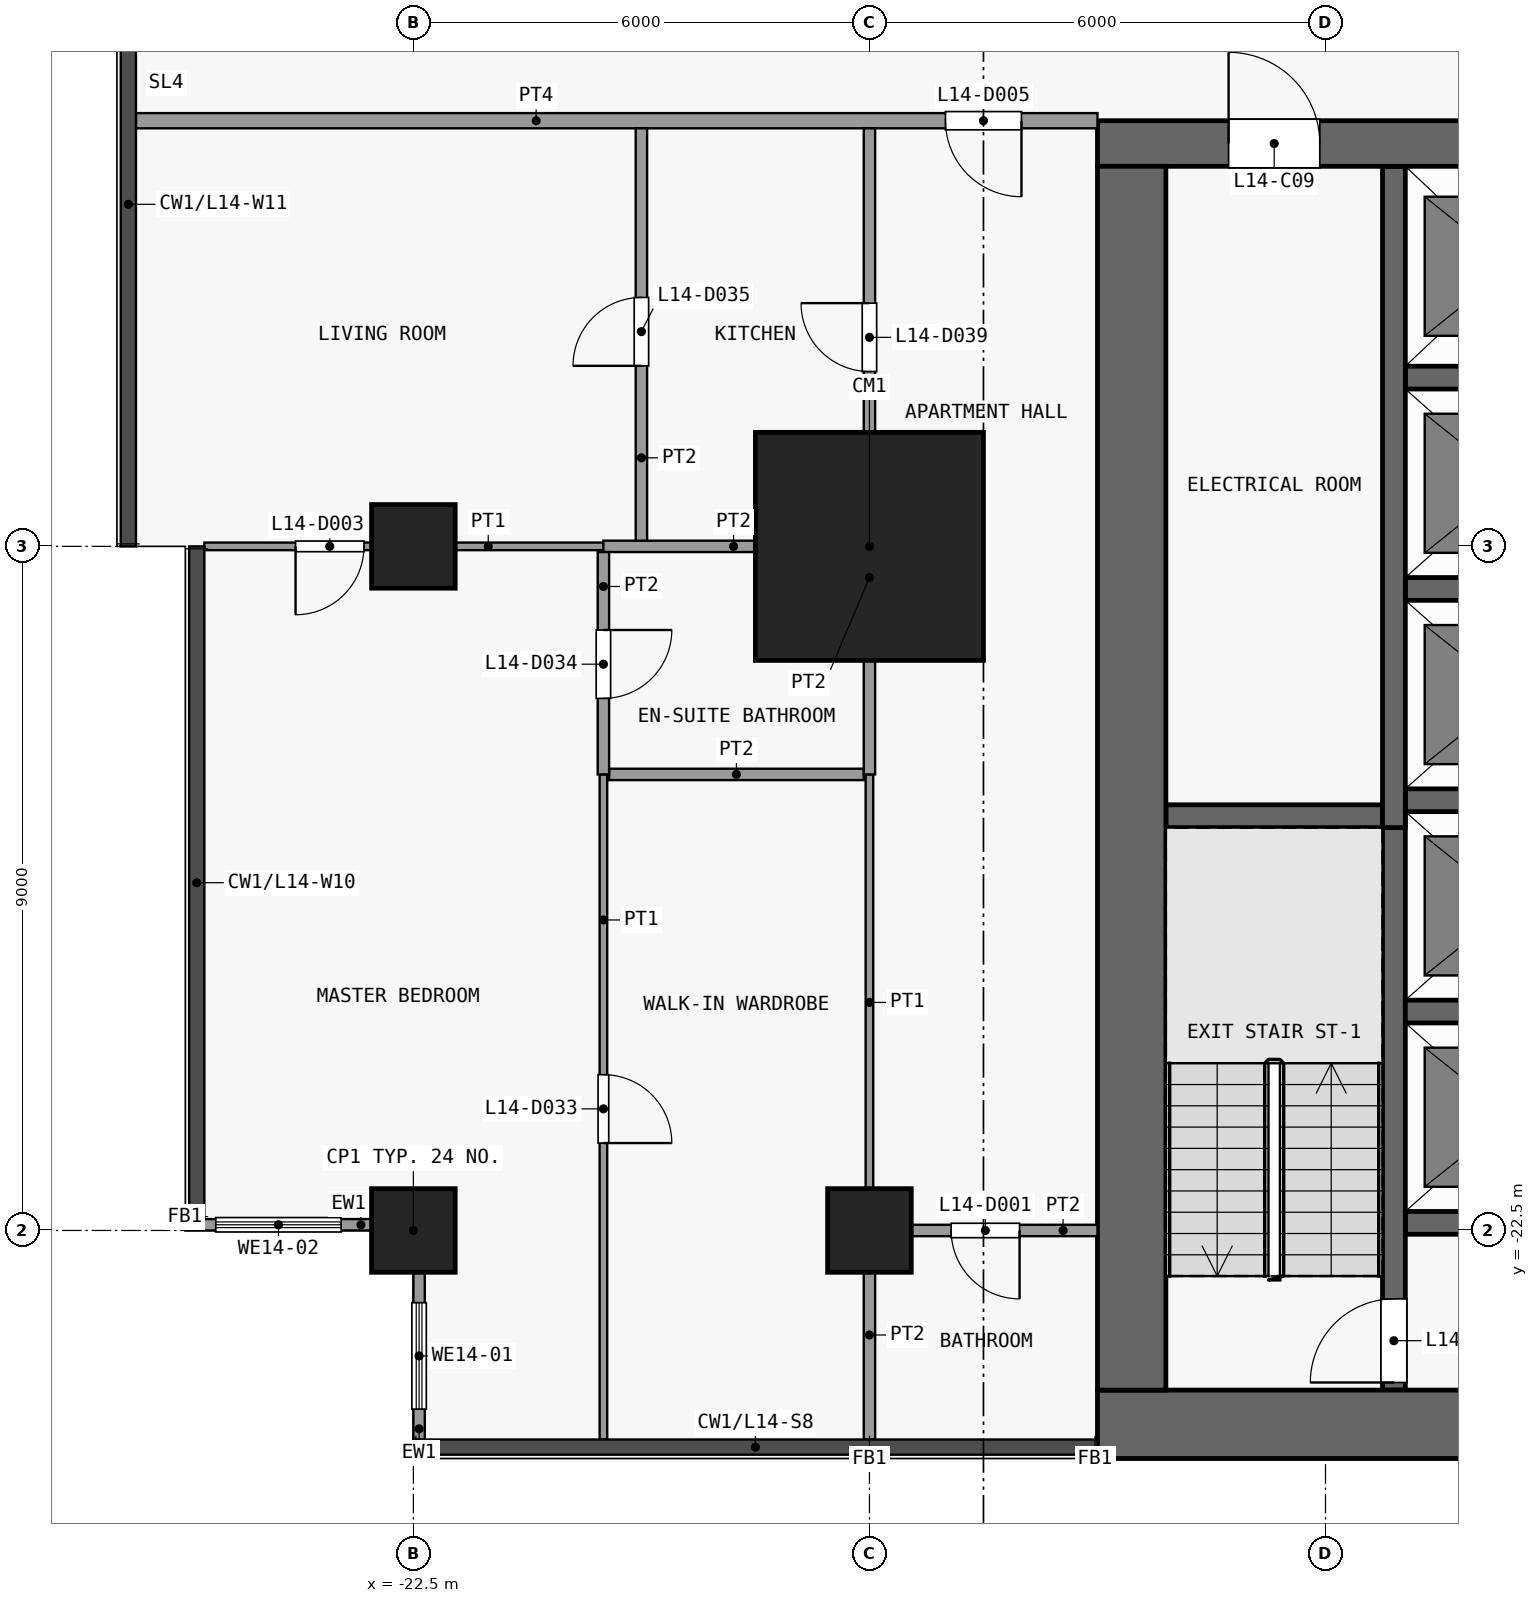
"""IFC4 building model, lengths in metres.
Left out: names, types, materials, properties, quantities, classifications, styles, units other than length and angle.
Written with IfcOpenShell. Run it as: python <this file> out.ifc"""

import sys

from ifc_helpers import new_model, si_unit, direction, frame, frame_2d, origin, origin_2d, place, context, subcontext, project, spatial, rectangle, extrude, element, fill, save


model = new_model("IFC4")
c1 = context("Model", 3, precision=1e-05, world=origin(), true_north=direction((0.0, 1.0)))
c2 = subcontext(c1, "Body", "Model", "MODEL_VIEW")
j1 = project(units=[si_unit("LENGTHUNIT", "METRE"), si_unit("PLANEANGLEUNIT", "RADIAN")], contexts=[c1])
p1 = place(None, origin())
s1 = spatial("IfcSite", under=j1, at=p1, CompositionType="ELEMENT")
p2 = place(p1, origin())
s2 = spatial("IfcBuilding", under=s1, at=p2, CompositionType="ELEMENT")
p3 = place(p2, frame((0.0, 0.0, 61.3)))
s3 = spatial("IfcBuildingStorey", under=s2, at=p3, CompositionType="ELEMENT", Elevation=61.3)
for number, where, z_axis, x_axis in (
    (1, (-22.5, -22.5, 0.0), (0.0, 0.0, 1.0), (1.0, 0.0, 0.0)),
    (2, (-22.5, -13.5, 0.0), (0.0, 0.0, 1.0), (1.0, 0.0, 0.0)),
    (3, (-16.5, -22.5, 0.0), (0.0, 0.0, 1.0), (1.0, 0.0, 0.0)),
):
    element("IfcColumn", number, at=place(p3, frame(where, z_axis=z_axis, x_axis=x_axis)), inside=s3, PredefinedType="COLUMN", context=c2, shape_type="SweptSolid", body=[
        extrude(rectangle(XDim=1.1, YDim=1.1, at=origin_2d()), origin(), (0.0, 0.0, 1.0), 3.6),
    ])
p4 = place(p3, frame((-16.5, -13.5, 0.0), z_axis=(0.0, 0.0, 1.0), x_axis=(1.0, 0.0, 0.0)))
e4 = element("IfcColumn", 4, at=p4, inside=s3, PredefinedType="COLUMN", context=c2, shape_type="SweptSolid", body=[
    extrude(rectangle(XDim=3.0, YDim=3.0, at=origin_2d()), origin(), (0.0, 0.0, 1.0), 3.6),
])
p5 = place(p3, frame((-13.5, -25.05, 0.0), z_axis=(0.0, 0.0, 1.0), x_axis=(1.0, 0.0, 0.0)))
e5 = element("IfcWall", 5, at=p5, inside=s3, PredefinedType="SHEAR", context=c2, shape_type="SweptSolid", body=[
    extrude(rectangle(XDim=27.0, YDim=0.9, at=frame_2d((13.5, 0.0))), origin(), (0.0, 0.0, 1.0), 3.3),
])
p6 = place(p3, frame((-13.5, -8.2, 0.0), z_axis=(0.0, 0.0, 1.0), x_axis=(1.0, 0.0, 0.0)))
e6 = element("IfcWall", 6, at=p6, inside=s3, PredefinedType="SHEAR", context=c2, shape_type="SweptSolid", body=[
    extrude(rectangle(XDim=27.0, YDim=0.6, at=frame_2d((13.5, 0.0))), origin(), (0.0, 0.0, 1.0), 3.3),
])
p7 = place(p6, frame((7.8, 0.0, 0.0)))
e7 = element("IfcOpeningElement", 7, at=p7, cuts=e6, PredefinedType="OPENING", context=c2, shape_type="SweptSolid", body=[
    extrude(rectangle(XDim=1.8, YDim=2.1, at=frame_2d((0.9, 1.05))), frame((0.0, 0.31, 0.0), z_axis=(0.0, -1.0, 0.0), x_axis=(1.0, 0.0, 0.0)), (0.0, 0.0, 1.0), 0.62),
])
p8 = place(p6, frame((17.4, 0.0, 0.0)))
e8 = element("IfcOpeningElement", 8, at=p8, cuts=e6, PredefinedType="OPENING", context=c2, shape_type="SweptSolid", body=[
    extrude(rectangle(XDim=1.8, YDim=2.1, at=frame_2d((0.9, 1.05))), frame((0.0, 0.31, 0.0), z_axis=(0.0, -1.0, 0.0), x_axis=(1.0, 0.0, 0.0)), (0.0, 0.0, 1.0), 0.62),
])
p9 = place(p6, frame((1.725, 0.0, 0.0)))
e9 = element("IfcOpeningElement", 9, at=p9, cuts=e6, PredefinedType="OPENING", context=c2, shape_type="SweptSolid", body=[
    extrude(rectangle(XDim=1.2, YDim=2.1, at=frame_2d((0.6, 1.05))), frame((0.0, 0.31, 0.0), z_axis=(0.0, -1.0, 0.0), x_axis=(1.0, 0.0, 0.0)), (0.0, 0.0, 1.0), 0.62),
])
p10 = place(p6, frame((23.375, 0.0, 0.0)))
e10 = element("IfcOpeningElement", 10, at=p10, cuts=e6, PredefinedType="OPENING", context=c2, shape_type="SweptSolid", body=[
    extrude(rectangle(XDim=0.9, YDim=2.1, at=frame_2d((0.45, 1.05))), frame((0.0, 0.31, 0.0), z_axis=(0.0, -1.0, 0.0), x_axis=(1.0, 0.0, 0.0)), (0.0, 0.0, 1.0), 0.62),
])
p11 = place(p3, frame((-13.05, -24.6, 0.0), z_axis=(0.0, 0.0, 1.0), x_axis=(0.0, 1.0, 0.0)))
e11 = element("IfcWall", 11, at=p11, inside=s3, PredefinedType="SHEAR", context=c2, shape_type="SweptSolid", body=[
    extrude(rectangle(XDim=16.1, YDim=0.9, at=frame_2d((8.05, 0.0))), origin(), (0.0, 0.0, 1.0), 3.3),
])
for number, where, z_axis, x_axis in (
    (12, (-9.45, -22.4, 0.0), (0.0, 0.0, 1.0), (1.0, 0.0, 0.0)),
    (13, (-9.45, -19.62, 0.0), (0.0, 0.0, 1.0), (1.0, 0.0, 0.0)),
):
    element("IfcWall", number, at=place(p3, frame(where, z_axis=z_axis, x_axis=x_axis)), inside=s3, PredefinedType="SHEAR", context=c2, shape_type="SweptSolid", body=[
        extrude(rectangle(XDim=2.8, YDim=0.3, at=frame_2d((1.4, 0.0))), origin(), (0.0, 0.0, 1.0), 3.3),
    ])
p12 = place(p3, frame((-12.6, -17.05, 0.0), z_axis=(0.0, 0.0, 1.0), x_axis=(1.0, 0.0, 0.0)))
e14 = element("IfcWall", 14, at=p12, inside=s3, PredefinedType="SHEAR", context=c2, shape_type="SweptSolid", body=[
    extrude(rectangle(XDim=2.85, YDim=0.3, at=frame_2d((1.425, 0.0))), origin(), (0.0, 0.0, 1.0), 3.3),
])
for number, where, z_axis, x_axis in (
    (15, (-9.45, -16.84, 0.0), (0.0, 0.0, 1.0), (1.0, 0.0, 0.0)),
    (16, (-9.45, -14.06, 0.0), (0.0, 0.0, 1.0), (1.0, 0.0, 0.0)),
    (17, (-9.45, -11.28, 0.0), (0.0, 0.0, 1.0), (1.0, 0.0, 0.0)),
):
    element("IfcWall", number, at=place(p3, frame(where, z_axis=z_axis, x_axis=x_axis)), inside=s3, PredefinedType="SHEAR", context=c2, shape_type="SweptSolid", body=[
        extrude(rectangle(XDim=2.8, YDim=0.3, at=frame_2d((1.4, 0.0))), origin(), (0.0, 0.0, 1.0), 3.3),
    ])
p13 = place(p3, frame((-9.6, -24.6, 0.0), z_axis=(0.0, 0.0, 1.0), x_axis=(0.0, 1.0, 0.0)))
e18 = element("IfcWall", 18, at=p13, inside=s3, PredefinedType="SHEAR", context=c2, shape_type="SweptSolid", body=[
    extrude(rectangle(XDim=7.7, YDim=0.3, at=frame_2d((3.85, 0.0))), origin(), (0.0, 0.0, 1.0), 3.3),
])
p14 = place(p13, frame((0.1, 0.0, 0.0)))
e19 = element("IfcOpeningElement", 19, at=p14, cuts=e18, PredefinedType="OPENING", context=c2, shape_type="SweptSolid", body=[
    extrude(rectangle(XDim=1.1, YDim=2.1, at=frame_2d((0.55, 1.05))), frame((0.0, 0.16, 0.0), z_axis=(0.0, -1.0, 0.0), x_axis=(1.0, 0.0, 0.0)), (0.0, 0.0, 1.0), 0.32),
])
p15 = place(p3, frame((-9.6, -17.2, 0.0), z_axis=(0.0, 0.0, 1.0), x_axis=(0.0, 1.0, 0.0)))
e20 = element("IfcWall", 20, at=p15, inside=s3, PredefinedType="SHEAR", context=c2, shape_type="SweptSolid", body=[
    extrude(rectangle(XDim=8.7, YDim=0.3, at=frame_2d((4.35, 0.0))), origin(), (0.0, 0.0, 1.0), 3.3),
])
p16 = place(p3, frame((-22.425, -25.25, 0.0), z_axis=(0.0, 0.0, 1.0), x_axis=(0.0, 1.0, 0.0)))
e21 = element("IfcWall", 21, at=p16, inside=s3, PredefinedType="SOLIDWALL", context=c2, shape_type="SweptSolid", body=[
    extrude(rectangle(XDim=2.2, YDim=0.15, at=frame_2d((1.1, 0.0))), origin(), (0.0, 0.0, 1.0), 3.3),
])
p17 = place(p16, frame((0.4, 0.0, 0.9)))
e22 = element("IfcOpeningElement", 22, at=p17, cuts=e21, PredefinedType="OPENING", context=c2, shape_type="SweptSolid", body=[
    extrude(rectangle(XDim=1.4, YDim=2.4, at=frame_2d((0.7, 1.2))), frame((0.0, 0.085, 0.0), z_axis=(0.0, -1.0, 0.0), x_axis=(1.0, 0.0, 0.0)), (0.0, 0.0, 1.0), 0.17),
])
p18 = place(p3, frame((-23.05, -22.425, 0.0), z_axis=(0.0, 0.0, 1.0), x_axis=(-1.0, 0.0, 0.0)))
e23 = element("IfcWall", 23, at=p18, inside=s3, PredefinedType="SOLIDWALL", context=c2, shape_type="SweptSolid", body=[
    extrude(rectangle(XDim=2.45, YDim=0.15, at=frame_2d((1.225, 0.0))), origin(), (0.0, 0.0, 1.0), 3.3),
])
p19 = place(p18, frame((0.4, 0.0, 0.9)))
e24 = element("IfcOpeningElement", 24, at=p19, cuts=e23, PredefinedType="OPENING", context=c2, shape_type="SweptSolid", body=[
    extrude(rectangle(XDim=1.65, YDim=2.4, at=frame_2d((0.825, 1.2))), frame((0.0, 0.085, 0.0), z_axis=(0.0, -1.0, 0.0), x_axis=(1.0, 0.0, 0.0)), (0.0, 0.0, 1.0), 0.17),
])
p20 = place(p3, frame((-16.425, -22.5, 0.0), z_axis=(0.0, 0.0, 1.0), x_axis=(1.0, 0.0, 0.0)))
e25 = element("IfcWall", 25, at=p20, inside=s3, PredefinedType="PARTITIONING", context=c2, shape_type="SweptSolid", body=[
    extrude(rectangle(XDim=2.925, YDim=0.15, at=frame_2d((1.462, 0.0))), origin(), (0.0, 0.0, 1.0), 3.3),
])
p21 = place(p20, frame((1.0, 0.0, 0.0)))
e26 = element("IfcOpeningElement", 26, at=p21, cuts=e25, PredefinedType="OPENING", context=c2, shape_type="SweptSolid", body=[
    extrude(rectangle(XDim=0.9, YDim=2.1, at=frame_2d((0.45, 1.05))), frame((0.0, 0.085, 0.0), z_axis=(0.0, -1.0, 0.0), x_axis=(1.0, 0.0, 0.0)), (0.0, 0.0, 1.0), 0.17),
])
p22 = place(p3, frame((-19.925, -16.5, 0.0), z_axis=(0.0, 0.0, 1.0), x_axis=(1.0, 0.0, 0.0)))
e27 = element("IfcWall", 27, at=p22, inside=s3, PredefinedType="PARTITIONING", context=c2, shape_type="SweptSolid", body=[
    extrude(rectangle(XDim=3.35, YDim=0.15, at=frame_2d((1.675, 0.0))), origin(), (0.0, 0.0, 1.0), 3.3),
])
p23 = place(p3, frame((-25.25, -13.5, 0.0), z_axis=(0.0, 0.0, 1.0), x_axis=(1.0, 0.0, 0.0)))
e28 = element("IfcWall", 28, at=p23, inside=s3, PredefinedType="PARTITIONING", context=c2, shape_type="SweptSolid", body=[
    extrude(rectangle(XDim=5.25, YDim=0.1, at=frame_2d((2.625, 0.0))), origin(), (0.0, 0.0, 1.0), 3.3),
])
p24 = place(p23, frame((1.2, 0.0, 0.0)))
e29 = element("IfcOpeningElement", 29, at=p24, cuts=e28, PredefinedType="OPENING", context=c2, shape_type="SweptSolid", body=[
    extrude(rectangle(XDim=0.9, YDim=2.1, at=frame_2d((0.45, 1.05))), frame((0.0, 0.06, 0.0), z_axis=(0.0, -1.0, 0.0), x_axis=(1.0, 0.0, 0.0)), (0.0, 0.0, 1.0), 0.12),
])
p25 = place(p3, frame((-20.0, -13.5, 0.0), z_axis=(0.0, 0.0, 1.0), x_axis=(1.0, 0.0, 0.0)))
e30 = element("IfcWall", 30, at=p25, inside=s3, PredefinedType="PARTITIONING", context=c2, shape_type="SweptSolid", body=[
    extrude(rectangle(XDim=3.425, YDim=0.15, at=frame_2d((1.712, 0.0))), origin(), (0.0, 0.0, 1.0), 3.3),
])
p26 = place(p3, frame((-26.15, -7.9, 0.0), z_axis=(0.0, 0.0, 1.0), x_axis=(1.0, 0.0, 0.0)))
e31 = element("IfcWall", 31, at=p26, inside=s3, PredefinedType="PARTITIONING", context=c2, shape_type="SweptSolid", body=[
    extrude(rectangle(XDim=12.65, YDim=0.2, at=frame_2d((6.325, 0.0))), origin(), (0.0, 0.0, 1.0), 3.3),
])
p27 = place(p26, frame((10.65, 0.0, 0.0)))
e32 = element("IfcOpeningElement", 32, at=p27, cuts=e31, PredefinedType="OPENING", context=c2, shape_type="SweptSolid", body=[
    extrude(rectangle(XDim=1.0, YDim=2.1, at=frame_2d((0.5, 1.05))), frame((0.0, 0.11, 0.0), z_axis=(0.0, -1.0, 0.0), x_axis=(1.0, 0.0, 0.0)), (0.0, 0.0, 1.0), 0.22),
])
p28 = place(p3, frame((-20.0, -25.25, 0.0), z_axis=(0.0, 0.0, 1.0), x_axis=(0.0, 1.0, 0.0)))
e33 = element("IfcWall", 33, at=p28, inside=s3, PredefinedType="PARTITIONING", context=c2, shape_type="SweptSolid", body=[
    extrude(rectangle(XDim=8.75, YDim=0.1, at=frame_2d((4.375, 0.0))), origin(), (0.0, 0.0, 1.0), 3.3),
])
p29 = place(p28, frame((3.9, 0.0, 0.0)))
e34 = element("IfcOpeningElement", 34, at=p29, cuts=e33, PredefinedType="OPENING", context=c2, shape_type="SweptSolid", body=[
    extrude(rectangle(XDim=0.9, YDim=2.1, at=frame_2d((0.45, 1.05))), frame((0.0, 0.06, 0.0), z_axis=(0.0, -1.0, 0.0), x_axis=(1.0, 0.0, 0.0)), (0.0, 0.0, 1.0), 0.12),
])
p30 = place(p3, frame((-20.0, -16.5, 0.0), z_axis=(0.0, 0.0, 1.0), x_axis=(0.0, 1.0, 0.0)))
e35 = element("IfcWall", 35, at=p30, inside=s3, PredefinedType="PARTITIONING", context=c2, shape_type="SweptSolid", body=[
    extrude(rectangle(XDim=2.925, YDim=0.15, at=frame_2d((1.462, 0.0))), origin(), (0.0, 0.0, 1.0), 3.3),
])
p31 = place(p30, frame((1.0, 0.0, 0.0)))
e36 = element("IfcOpeningElement", 36, at=p31, cuts=e35, PredefinedType="OPENING", context=c2, shape_type="SweptSolid", body=[
    extrude(rectangle(XDim=0.9, YDim=2.1, at=frame_2d((0.45, 1.05))), frame((0.0, 0.085, 0.0), z_axis=(0.0, -1.0, 0.0), x_axis=(1.0, 0.0, 0.0)), (0.0, 0.0, 1.0), 0.17),
])
p32 = place(p3, frame((-19.5, -13.425, 0.0), z_axis=(0.0, 0.0, 1.0), x_axis=(0.0, 1.0, 0.0)))
e37 = element("IfcWall", 37, at=p32, inside=s3, PredefinedType="PARTITIONING", context=c2, shape_type="SweptSolid", body=[
    extrude(rectangle(XDim=5.425, YDim=0.15, at=frame_2d((2.712, 0.0))), origin(), (0.0, 0.0, 1.0), 3.3),
])
p33 = place(p32, frame((2.3, 0.0, 0.0)))
e38 = element("IfcOpeningElement", 38, at=p33, cuts=e37, PredefinedType="OPENING", context=c2, shape_type="SweptSolid", body=[
    extrude(rectangle(XDim=0.9, YDim=2.1, at=frame_2d((0.45, 1.05))), frame((0.0, 0.085, 0.0), z_axis=(0.0, -1.0, 0.0), x_axis=(1.0, 0.0, 0.0)), (0.0, 0.0, 1.0), 0.17),
])
p34 = place(p3, frame((-16.5, -22.5, 0.0), z_axis=(0.0, 0.0, 1.0), x_axis=(0.0, 1.0, 0.0)))
e39 = element("IfcWall", 39, at=p34, inside=s3, PredefinedType="PARTITIONING", context=c2, shape_type="SweptSolid", body=[
    extrude(rectangle(XDim=6.0, YDim=0.1, at=frame_2d((3.0, 0.0))), origin(), (0.0, 0.0, 1.0), 3.3),
])
p35 = place(p3, frame((-16.5, -25.25, 0.0), z_axis=(0.0, 0.0, 1.0), x_axis=(0.0, 1.0, 0.0)))
e40 = element("IfcWall", 40, at=p35, inside=s3, PredefinedType="PARTITIONING", context=c2, shape_type="SweptSolid", body=[
    extrude(rectangle(XDim=2.75, YDim=0.15, at=frame_2d((1.375, 0.0))), origin(), (0.0, 0.0, 1.0), 3.3),
])
p36 = place(p3, frame((-16.5, -16.5, 0.0), z_axis=(0.0, 0.0, 1.0), x_axis=(0.0, 1.0, 0.0)))
e41 = element("IfcWall", 41, at=p36, inside=s3, PredefinedType="PARTITIONING", context=c2, shape_type="SweptSolid", body=[
    extrude(rectangle(XDim=8.5, YDim=0.15, at=frame_2d((4.25, 0.0))), origin(), (0.0, 0.0, 1.0), 3.3),
])
p37 = place(p36, frame((5.3, 0.0, 0.0)))
e42 = element("IfcOpeningElement", 42, at=p37, cuts=e41, PredefinedType="OPENING", context=c2, shape_type="SweptSolid", body=[
    extrude(rectangle(XDim=0.9, YDim=2.1, at=frame_2d((0.45, 1.05))), frame((0.0, 0.085, 0.0), z_axis=(0.0, -1.0, 0.0), x_axis=(1.0, 0.0, 0.0)), (0.0, 0.0, 1.0), 0.17),
])
p38 = place(p9, origin())
e43 = element("IfcDoor", 43, at=p38, inside=s3, OperationType="SINGLE_SWING_LEFT", PredefinedType="DOOR", context=c2, shape_type="SweptSolid", body=[
    extrude(rectangle(XDim=1.2, YDim=2.1, at=frame_2d((0.6, 1.05))), frame((0.0, 0.025, 0.0), z_axis=(0.0, -1.0, 0.0), x_axis=(1.0, 0.0, 0.0)), (0.0, 0.0, 1.0), 0.05),
])
fill(e9, e43)
p39 = place(p14, origin())
e44 = element("IfcDoor", 44, at=p39, inside=s3, OperationType="SINGLE_SWING_LEFT", PredefinedType="DOOR", context=c2, shape_type="SweptSolid", body=[
    extrude(rectangle(XDim=1.1, YDim=2.1, at=frame_2d((0.55, 1.05))), frame((0.0, 0.025, 0.0), z_axis=(0.0, -1.0, 0.0), x_axis=(1.0, 0.0, 0.0)), (0.0, 0.0, 1.0), 0.05),
])
fill(e19, e44)
p40 = place(p17, origin())
e45 = element("IfcWindow", 45, at=p40, inside=s3, PartitioningType="SINGLE_PANEL", PredefinedType="WINDOW", context=c2, shape_type="SweptSolid", body=[
    extrude(rectangle(XDim=1.4, YDim=2.4, at=frame_2d((0.7, 1.2))), frame((0.0, 0.03, 0.0), z_axis=(0.0, -1.0, 0.0), x_axis=(1.0, 0.0, 0.0)), (0.0, 0.0, 1.0), 0.06),
])
fill(e22, e45)
p41 = place(p19, origin())
e46 = element("IfcWindow", 46, at=p41, inside=s3, PartitioningType="SINGLE_PANEL", PredefinedType="WINDOW", context=c2, shape_type="SweptSolid", body=[
    extrude(rectangle(XDim=1.65, YDim=2.4, at=frame_2d((0.825, 1.2))), frame((0.0, 0.03, 0.0), z_axis=(0.0, -1.0, 0.0), x_axis=(1.0, 0.0, 0.0)), (0.0, 0.0, 1.0), 0.06),
])
fill(e24, e46)
p42 = place(p21, origin())
e47 = element("IfcDoor", 47, at=p42, inside=s3, OperationType="SINGLE_SWING_RIGHT", PredefinedType="DOOR", context=c2, shape_type="SweptSolid", body=[
    extrude(rectangle(XDim=0.9, YDim=2.1, at=frame_2d((0.45, 1.05))), frame((0.0, 0.025, 0.0), z_axis=(0.0, -1.0, 0.0), x_axis=(1.0, 0.0, 0.0)), (0.0, 0.0, 1.0), 0.05),
])
fill(e26, e47)
p43 = place(p24, origin())
e48 = element("IfcDoor", 48, at=p43, inside=s3, OperationType="SINGLE_SWING_LEFT", PredefinedType="DOOR", context=c2, shape_type="SweptSolid", body=[
    extrude(rectangle(XDim=0.9, YDim=2.1, at=frame_2d((0.45, 1.05))), frame((0.0, 0.025, 0.0), z_axis=(0.0, -1.0, 0.0), x_axis=(1.0, 0.0, 0.0)), (0.0, 0.0, 1.0), 0.05),
])
fill(e29, e48)
p44 = place(p27, origin())
e49 = element("IfcDoor", 49, at=p44, inside=s3, OperationType="SINGLE_SWING_RIGHT", PredefinedType="DOOR", context=c2, shape_type="SweptSolid", body=[
    extrude(rectangle(XDim=1.0, YDim=2.1, at=frame_2d((0.5, 1.05))), frame((0.0, 0.025, 0.0), z_axis=(0.0, -1.0, 0.0), x_axis=(1.0, 0.0, 0.0)), (0.0, 0.0, 1.0), 0.05),
])
fill(e32, e49)
p45 = place(p29, origin())
e50 = element("IfcDoor", 50, at=p45, inside=s3, OperationType="SINGLE_SWING_LEFT", PredefinedType="DOOR", context=c2, shape_type="SweptSolid", body=[
    extrude(rectangle(XDim=0.9, YDim=2.1, at=frame_2d((0.45, 1.05))), frame((0.0, 0.025, 0.0), z_axis=(0.0, -1.0, 0.0), x_axis=(1.0, 0.0, 0.0)), (0.0, 0.0, 1.0), 0.05),
])
fill(e34, e50)
p46 = place(p31, origin())
e51 = element("IfcDoor", 51, at=p46, inside=s3, OperationType="SINGLE_SWING_RIGHT", PredefinedType="DOOR", context=c2, shape_type="SweptSolid", body=[
    extrude(rectangle(XDim=0.9, YDim=2.1, at=frame_2d((0.45, 1.05))), frame((0.0, 0.025, 0.0), z_axis=(0.0, -1.0, 0.0), x_axis=(1.0, 0.0, 0.0)), (0.0, 0.0, 1.0), 0.05),
])
fill(e36, e51)
p47 = place(p33, origin())
e52 = element("IfcDoor", 52, at=p47, inside=s3, OperationType="SINGLE_SWING_RIGHT", PredefinedType="DOOR", context=c2, shape_type="SweptSolid", body=[
    extrude(rectangle(XDim=0.9, YDim=2.1, at=frame_2d((0.45, 1.05))), frame((0.0, 0.025, 0.0), z_axis=(0.0, -1.0, 0.0), x_axis=(1.0, 0.0, 0.0)), (0.0, 0.0, 1.0), 0.05),
])
fill(e38, e52)
p48 = place(p37, origin())
e53 = element("IfcDoor", 53, at=p48, inside=s3, OperationType="SINGLE_SWING_LEFT", PredefinedType="DOOR", context=c2, shape_type="SweptSolid", body=[
    extrude(rectangle(XDim=0.9, YDim=2.1, at=frame_2d((0.45, 1.05))), frame((0.0, 0.025, 0.0), z_axis=(0.0, -1.0, 0.0), x_axis=(1.0, 0.0, 0.0)), (0.0, 0.0, 1.0), 0.05),
])
fill(e42, e53)
save(model, sys.argv[1])
